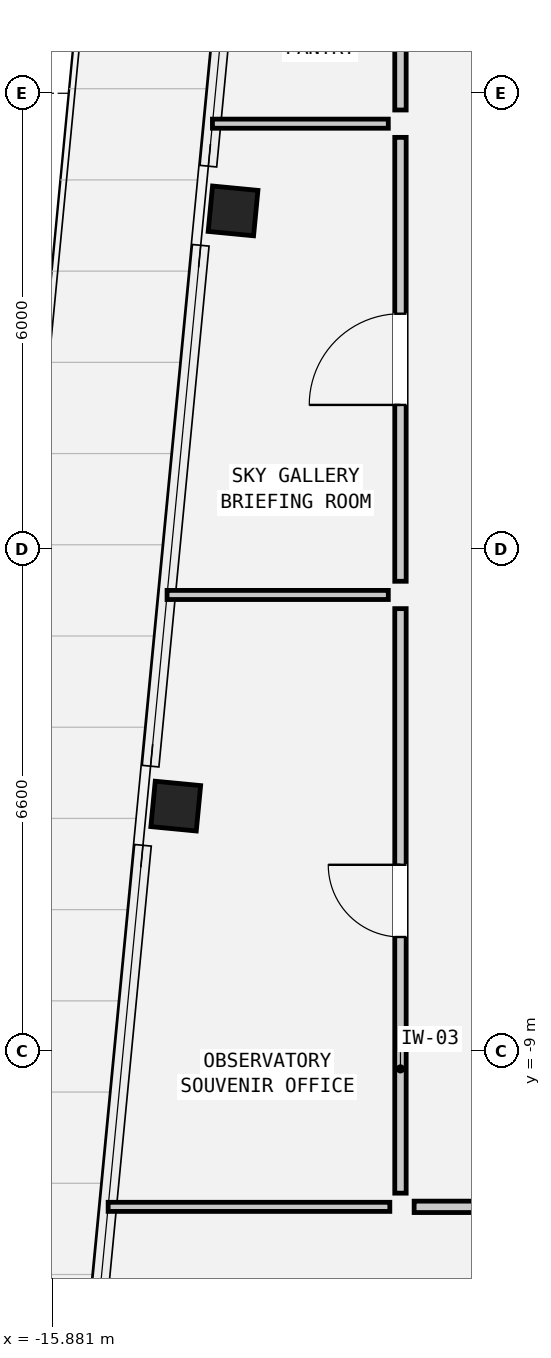
"""IFC4 building model, lengths in metres.
Left out: names, types, materials, properties, quantities, classifications, styles, units other than length and angle.
Written with IfcOpenShell. Run it as: python <this file> out.ifc"""

import sys

from ifc_helpers import new_model, si_unit, direction, frame, frame_2d, origin, origin_2d, place, context, subcontext, project, spatial, rectangle, hollow_rectangle, extrude, element, fill, save


model = new_model("IFC4")
c1 = context("Model", 3, precision=1e-05, world=origin(), true_north=direction((0.0, 1.0)))
c2 = subcontext(c1, "Body", "Model", "MODEL_VIEW")
j1 = project(units=[si_unit("LENGTHUNIT", "METRE"), si_unit("PLANEANGLEUNIT", "RADIAN")], contexts=[c1])
p1 = place(None, origin())
s1 = spatial("IfcSite", under=j1, at=p1, CompositionType="ELEMENT")
p2 = place(p1, origin())
s2 = spatial("IfcBuilding", under=s1, at=p2, CompositionType="ELEMENT")
p3 = place(p2, frame((0.0, 0.0, 280.55)))
s3 = spatial("IfcBuildingStorey", under=s2, at=p3, CompositionType="ELEMENT", Elevation=280.55)
for number, where, z_axis, x_axis in (
    (1, (-13.502, 2.052, 0.0), (0.0, 0.0, 1.0), (0.096, 0.995, 0.0)),
    (2, (-14.256, -5.778, 0.0), (0.0, 0.0, 1.0), (0.096, 0.995, 0.0)),
):
    element("IfcColumn", number, at=place(p3, frame(where, z_axis=z_axis, x_axis=x_axis)), inside=s3, PredefinedType="COLUMN", context=c2, shape_type="SweptSolid", body=[
        extrude(hollow_rectangle(XDim=0.6, YDim=0.6, WallThickness=0.04, at=origin_2d()), origin(), (0.0, 0.0, 1.0), 4.35),
    ])
p4 = place(p3, frame((-15.146, -11.05, 0.0), z_axis=(0.0, 0.0, 1.0), x_axis=(1.0, 0.0, 0.0)))
e3 = element("IfcWall", 3, at=p4, inside=s3, PredefinedType="PARTITIONING", context=c2, shape_type="SweptSolid", body=[
    extrude(rectangle(XDim=3.706, YDim=0.12, at=frame_2d((1.853, 0.0))), origin(), (0.0, 0.0, 1.0), 4.07),
])
p5 = place(p3, frame((-14.371, -3.0, 0.0), z_axis=(0.0, 0.0, 1.0), x_axis=(1.0, 0.0, 0.0)))
e4 = element("IfcWall", 4, at=p5, inside=s3, PredefinedType="PARTITIONING", context=c2, shape_type="SweptSolid", body=[
    extrude(rectangle(XDim=2.911, YDim=0.12, at=frame_2d((1.455, 0.0))), origin(), (0.0, 0.0, 1.0), 2.25),
])
p6 = place(p3, frame((-13.774, 3.2, 0.0), z_axis=(0.0, 0.0, 1.0), x_axis=(1.0, 0.0, 0.0)))
e5 = element("IfcWall", 5, at=p6, inside=s3, PredefinedType="PARTITIONING", context=c2, shape_type="SweptSolid", body=[
    extrude(rectangle(XDim=2.314, YDim=0.12, at=frame_2d((1.157, 0.0))), origin(), (0.0, 0.0, 1.0), 4.07),
])
p7 = place(p3, frame((-11.12, -11.05, 0.0), z_axis=(0.0, 0.0, 1.0), x_axis=(1.0, 0.0, 0.0)))
e6 = element("IfcWall", 6, at=p7, inside=s3, PredefinedType="PARTITIONING", context=c2, shape_type="SweptSolid", body=[
    extrude(rectangle(XDim=5.74, YDim=0.15, at=frame_2d((2.87, 0.0))), origin(), (0.0, 0.0, 1.0), 4.07),
])
p8 = place(p7, frame((2.27, 0.0, 0.0)))
e7 = element("IfcOpeningElement", 7, at=p8, cuts=e6, PredefinedType="OPENING", context=c2, shape_type="SweptSolid", body=[
    extrude(rectangle(XDim=1.2, YDim=2.1, at=frame_2d((0.6, 1.05))), frame((0.0, 0.087, 0.0), z_axis=(0.0, -1.0, 0.0), x_axis=(1.0, 0.0, 0.0)), (0.0, 0.0, 1.0), 0.174),
])
p9 = place(p3, frame((-11.3, -10.87, 0.0), z_axis=(0.0, 0.0, 1.0), x_axis=(0.0, 1.0, 0.0)))
e8 = element("IfcWall", 8, at=p9, inside=s3, PredefinedType="PARTITIONING", context=c2, shape_type="SweptSolid", body=[
    extrude(rectangle(XDim=7.69, YDim=0.15, at=frame_2d((3.845, 0.0))), origin(), (0.0, 0.0, 1.0), 4.07),
])
p10 = place(p9, frame((3.37, 0.0, 0.0)))
e9 = element("IfcOpeningElement", 9, at=p10, cuts=e8, PredefinedType="OPENING", context=c2, shape_type="SweptSolid", body=[
    extrude(rectangle(XDim=0.95, YDim=2.1, at=frame_2d((0.475, 1.05))), frame((0.0, 0.087, 0.0), z_axis=(0.0, -1.0, 0.0), x_axis=(1.0, 0.0, 0.0)), (0.0, 0.0, 1.0), 0.174),
])
p11 = place(p3, frame((-11.3, -2.82, 0.0), z_axis=(0.0, 0.0, 1.0), x_axis=(0.0, 1.0, 0.0)))
e10 = element("IfcWall", 10, at=p11, inside=s3, PredefinedType="PARTITIONING", context=c2, shape_type="SweptSolid", body=[
    extrude(rectangle(XDim=5.84, YDim=0.15, at=frame_2d((2.92, 0.0))), origin(), (0.0, 0.0, 1.0), 4.07),
])
p12 = place(p11, frame((2.32, 0.0, 0.0)))
e11 = element("IfcOpeningElement", 11, at=p12, cuts=e10, PredefinedType="OPENING", context=c2, shape_type="SweptSolid", body=[
    extrude(rectangle(XDim=1.2, YDim=2.1, at=frame_2d((0.6, 1.05))), frame((0.0, 0.087, 0.0), z_axis=(0.0, -1.0, 0.0), x_axis=(1.0, 0.0, 0.0)), (0.0, 0.0, 1.0), 0.174),
])
p13 = place(p3, frame((-11.3, 3.38, 0.0), z_axis=(0.0, 0.0, 1.0), x_axis=(0.0, 1.0, 0.0)))
e12 = element("IfcWall", 12, at=p13, inside=s3, PredefinedType="PARTITIONING", context=c2, shape_type="SweptSolid", body=[
    extrude(rectangle(XDim=8.69, YDim=0.15, at=frame_2d((4.345, 0.0))), origin(), (0.0, 0.0, 1.0), 4.07),
])
p14 = place(p13, frame((3.87, 0.0, 0.0)))
e13 = element("IfcOpeningElement", 13, at=p14, cuts=e12, PredefinedType="OPENING", context=c2, shape_type="SweptSolid", body=[
    extrude(rectangle(XDim=0.95, YDim=2.1, at=frame_2d((0.475, 1.05))), frame((0.0, 0.087, 0.0), z_axis=(0.0, -1.0, 0.0), x_axis=(1.0, 0.0, 0.0)), (0.0, 0.0, 1.0), 0.174),
])
p15 = place(p10, origin())
e14 = element("IfcDoor", 14, at=p15, inside=s3, OperationType="SINGLE_SWING_RIGHT", PredefinedType="DOOR", context=c2, shape_type="SweptSolid", body=[
    extrude(rectangle(XDim=0.95, YDim=2.1, at=frame_2d((0.475, 1.05))), frame((0.0, 0.025, 0.0), z_axis=(0.0, -1.0, 0.0), x_axis=(1.0, 0.0, 0.0)), (0.0, 0.0, 1.0), 0.05),
])
fill(e9, e14)
p16 = place(p12, origin())
e15 = element("IfcDoor", 15, at=p16, inside=s3, OperationType="SINGLE_SWING_LEFT", PredefinedType="DOOR", context=c2, shape_type="SweptSolid", body=[
    extrude(rectangle(XDim=1.2, YDim=2.1, at=frame_2d((0.6, 1.05))), frame((0.0, 0.025, 0.0), z_axis=(0.0, -1.0, 0.0), x_axis=(1.0, 0.0, 0.0)), (0.0, 0.0, 1.0), 0.05),
])
fill(e11, e15)
save(model, sys.argv[1])
